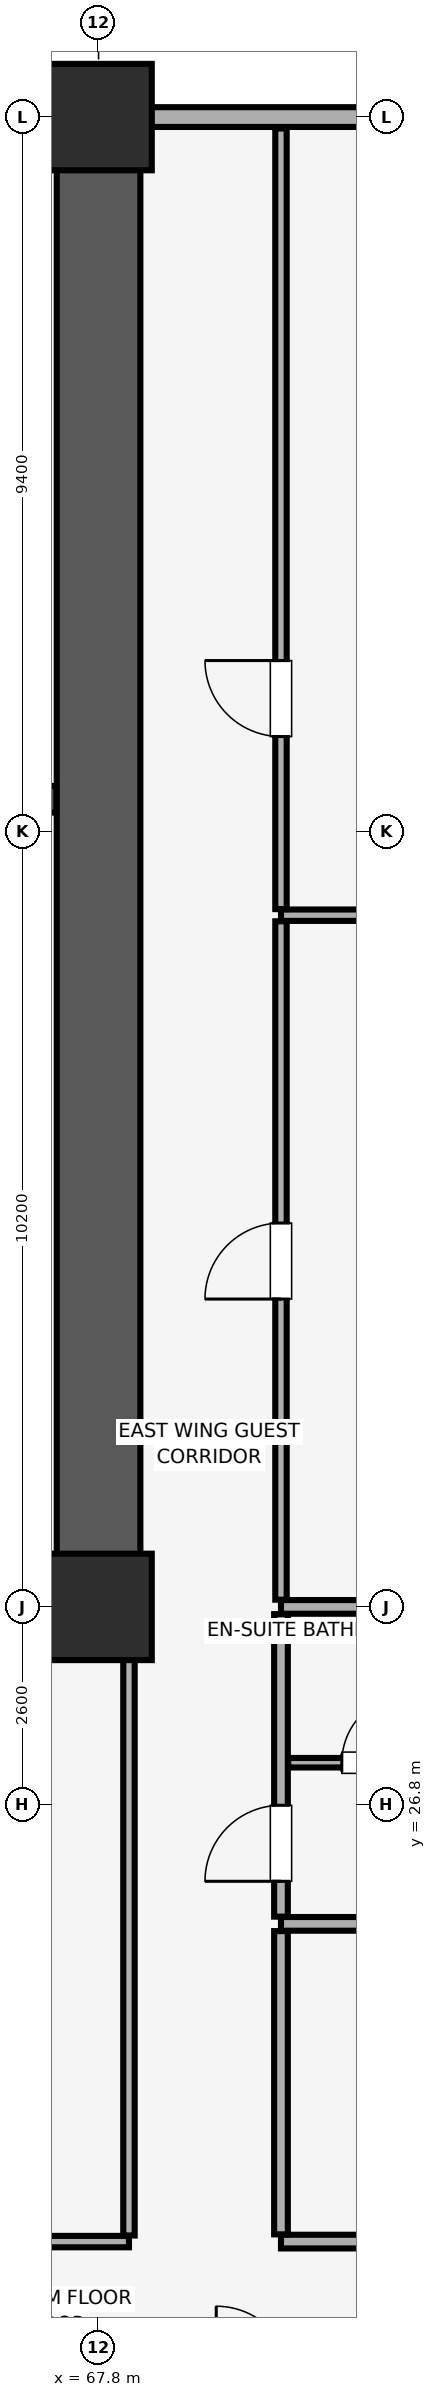
"""IFC4 building model, lengths in metres.
Left out: names, types, materials, properties, quantities, classifications, styles, units other than length and angle.
Written with IfcOpenShell. Run it as: python <this file> out.ifc"""

import sys

from ifc_helpers import new_model, si_unit, direction, frame, frame_2d, origin, origin_2d, place, context, subcontext, project, spatial, rectangle, extrude, element, fill, save


model = new_model("IFC4")
c1 = context("Model", 3, precision=1e-05, world=origin(), true_north=direction((0.0, 1.0)))
c2 = subcontext(c1, "Body", "Model", "MODEL_VIEW")
j1 = project(units=[si_unit("LENGTHUNIT", "METRE"), si_unit("PLANEANGLEUNIT", "RADIAN")], contexts=[c1])
p1 = place(None, origin())
s1 = spatial("IfcSite", under=j1, at=p1, CompositionType="ELEMENT")
p2 = place(p1, origin())
s2 = spatial("IfcBuilding", under=s1, at=p2, CompositionType="ELEMENT")
p3 = place(p2, frame((0.0, 0.0, 76.4)))
s3 = spatial("IfcBuildingStorey", under=s2, at=p3, CompositionType="ELEMENT", Elevation=76.4)
for number, where, z_axis, x_axis in (
    (1, (67.8, 29.4, 0.0), (0.0, 0.0, 1.0), (1.0, 0.0, 0.0)),
    (2, (67.8, 49.0, 0.0), (0.0, 0.0, 1.0), (1.0, 0.0, 0.0)),
):
    element("IfcColumn", number, at=place(p3, frame(where, z_axis=z_axis, x_axis=x_axis)), inside=s3, PredefinedType="COLUMN", context=c2, shape_type="SweptSolid", body=[
        extrude(rectangle(XDim=1.4, YDim=1.4, at=origin_2d()), origin(), (0.0, 0.0, 1.0), 3.4),
    ])
p4 = place(p3, frame((79.8, 49.0, 0.0), z_axis=(0.0, 0.0, 1.0), x_axis=(-1.0, 0.0, 0.0)))
e3 = element("IfcWall", 3, at=p4, inside=s3, PredefinedType="SOLIDWALL", context=c2, shape_type="SweptSolid", body=[
    extrude(rectangle(XDim=75.6, YDim=0.26, at=frame_2d((37.8, 0.0))), origin(), (0.0, 0.0, 1.0), 2.45),
])
p5 = place(p3, frame((67.8, 29.4, 0.0), z_axis=(0.0, 0.0, 1.0), x_axis=(0.0, 1.0, 0.0)))
e4 = element("IfcWall", 4, at=p5, inside=s3, PredefinedType="SHEAR", context=c2, shape_type="SweptSolid", body=[
    extrude(rectangle(XDim=19.2, YDim=1.1, at=frame_2d((9.6, 0.0))), origin(), (0.0, 0.0, 1.0), 3.4),
])
p6 = place(p3, frame((60.4, 29.4, 0.0), z_axis=(0.0, 0.0, 1.0), x_axis=(1.0, 0.0, 0.0)))
e5 = element("IfcWall", 5, at=p6, inside=s3, PredefinedType="SHEAR", context=c2, shape_type="SweptSolid", body=[
    extrude(rectangle(XDim=6.845, YDim=1.1, at=frame_2d((3.423, 0.0))), origin(), (0.0, 0.0, 1.0), 3.4),
])
p7 = place(p3, frame((63.145, 40.025, 0.0), z_axis=(0.0, 0.0, 1.0), x_axis=(1.0, 0.0, 0.0)))
e6 = element("IfcWall", 6, at=p7, inside=s3, PredefinedType="SHEAR", context=c2, shape_type="SweptSolid", body=[
    extrude(rectangle(XDim=4.1, YDim=0.35, at=frame_2d((2.05, 0.0))), origin(), (0.0, 0.0, 1.0), 3.4),
])
p8 = place(p7, frame((1.24, 0.0, 0.0)))
e7 = element("IfcOpeningElement", 7, at=p8, cuts=e6, PredefinedType="OPENING", context=c2, shape_type="SweptSolid", body=[
    extrude(rectangle(XDim=1.15, YDim=2.15, at=frame_2d((0.575, 1.075))), frame((0.0, 0.185, 0.0), z_axis=(0.0, -1.0, 0.0), x_axis=(1.0, 0.0, 0.0)), (0.0, 0.0, 1.0), 0.37),
])
p9 = place(p3, frame((54.28, 21.05, 0.0), z_axis=(0.0, 0.0, 1.0), x_axis=(1.0, 0.0, 0.0)))
e8 = element("IfcWall", 8, at=p9, inside=s3, PredefinedType="PARTITIONING", context=c2, shape_type="SweptSolid", body=[
    extrude(rectangle(XDim=13.92, YDim=0.15, at=frame_2d((6.96, 0.0))), origin(), (0.0, 0.0, 1.0), 3.4),
])
p10 = place(p9, frame((7.17, 0.0, 0.0)))
e9 = element("IfcOpeningElement", 9, at=p10, cuts=e8, PredefinedType="OPENING", context=c2, shape_type="SweptSolid", body=[
    extrude(rectangle(XDim=1.0, YDim=2.15, at=frame_2d((0.5, 1.075))), frame((0.0, 0.085, 0.0), z_axis=(0.0, -1.0, 0.0), x_axis=(1.0, 0.0, 0.0)), (0.0, 0.0, 1.0), 0.17),
])
p11 = place(p3, frame((68.2, 21.13, 0.0), z_axis=(0.0, 0.0, 1.0), x_axis=(0.0, 1.0, 0.0)))
e10 = element("IfcWall", 10, at=p11, inside=s3, PredefinedType="PARTITIONING", context=c2, shape_type="SweptSolid", body=[
    extrude(rectangle(XDim=8.26, YDim=0.15, at=frame_2d((4.13, 0.0))), origin(), (0.0, 0.0, 1.0), 3.4),
])
p12 = place(p3, frame((70.2, 21.05, 0.0), z_axis=(0.0, 0.0, 1.0), x_axis=(1.0, 0.0, 0.0)))
e11 = element("IfcWall", 11, at=p12, inside=s3, PredefinedType="PARTITIONING", context=c2, shape_type="SweptSolid", body=[
    extrude(rectangle(XDim=13.65, YDim=0.18, at=frame_2d((6.825, 0.0))), origin(), (0.0, 0.0, 1.0), 3.4),
])
p13 = place(p12, frame((1.51, 0.0, 0.0)))
e12 = element("IfcOpeningElement", 12, at=p13, cuts=e11, PredefinedType="OPENING", context=c2, shape_type="SweptSolid", body=[
    extrude(rectangle(XDim=1.0, YDim=2.15, at=frame_2d((0.5, 1.075))), frame((0.0, 0.1, 0.0), z_axis=(0.0, -1.0, 0.0), x_axis=(1.0, 0.0, 0.0)), (0.0, 0.0, 1.0), 0.2),
])
p14 = place(p3, frame((70.2, 25.23, 0.0), z_axis=(0.0, 0.0, 1.0), x_axis=(1.0, 0.0, 0.0)))
e13 = element("IfcWall", 13, at=p14, inside=s3, PredefinedType="PARTITIONING", context=c2, shape_type="SweptSolid", body=[
    extrude(rectangle(XDim=13.65, YDim=0.18, at=frame_2d((6.825, 0.0))), origin(), (0.0, 0.0, 1.0), 3.4),
])
p15 = place(p3, frame((70.2, 21.145, 0.0), z_axis=(0.0, 0.0, 1.0), x_axis=(0.0, 1.0, 0.0)))
e14 = element("IfcWall", 14, at=p15, inside=s3, PredefinedType="PARTITIONING", context=c2, shape_type="SweptSolid", body=[
    extrude(rectangle(XDim=3.99, YDim=0.18, at=frame_2d((1.995, 0.0))), origin(), (0.0, 0.0, 1.0), 3.4),
])
p16 = place(p3, frame((70.2, 29.4, 0.0), z_axis=(0.0, 0.0, 1.0), x_axis=(1.0, 0.0, 0.0)))
e15 = element("IfcWall", 15, at=p16, inside=s3, PredefinedType="PARTITIONING", context=c2, shape_type="SweptSolid", body=[
    extrude(rectangle(XDim=13.65, YDim=0.18, at=frame_2d((6.825, 0.0))), origin(), (0.0, 0.0, 1.0), 2.49),
])
p17 = place(p3, frame((70.2, 25.325, 0.0), z_axis=(0.0, 0.0, 1.0), x_axis=(0.0, 1.0, 0.0)))
e16 = element("IfcWall", 16, at=p17, inside=s3, PredefinedType="PARTITIONING", context=c2, shape_type="SweptSolid", body=[
    extrude(rectangle(XDim=3.98, YDim=0.18, at=frame_2d((1.99, 0.0))), origin(), (0.0, 0.0, 1.0), 3.4),
])
p18 = place(p17, frame((0.465, 0.0, 0.0)))
e17 = element("IfcOpeningElement", 17, at=p18, cuts=e16, PredefinedType="OPENING", context=c2, shape_type="SweptSolid", body=[
    extrude(rectangle(XDim=1.0, YDim=2.15, at=frame_2d((0.5, 1.075))), frame((0.0, 0.1, 0.0), z_axis=(0.0, -1.0, 0.0), x_axis=(1.0, 0.0, 0.0)), (0.0, 0.0, 1.0), 0.2),
])
p19 = place(p3, frame((70.295, 27.35, 0.0), z_axis=(0.0, 0.0, 1.0), x_axis=(1.0, 0.0, 0.0)))
e18 = element("IfcWall", 18, at=p19, inside=s3, PredefinedType="PARTITIONING", context=c2, shape_type="SweptSolid", body=[
    extrude(rectangle(XDim=2.405, YDim=0.125, at=frame_2d((1.203, 0.0))), origin(), (0.0, 0.0, 1.0), 3.4),
])
p20 = place(p19, frame((0.705, 0.0, 0.0)))
e19 = element("IfcOpeningElement", 19, at=p20, cuts=e18, PredefinedType="OPENING", context=c2, shape_type="SweptSolid", body=[
    extrude(rectangle(XDim=0.9, YDim=2.1, at=frame_2d((0.45, 1.05))), frame((0.0, 0.073, 0.0), z_axis=(0.0, -1.0, 0.0), x_axis=(1.0, 0.0, 0.0)), (0.0, 0.0, 1.0), 0.145),
])
p21 = place(p3, frame((70.2, 38.5, 0.0), z_axis=(0.0, 0.0, 1.0), x_axis=(1.0, 0.0, 0.0)))
e20 = element("IfcWall", 20, at=p21, inside=s3, PredefinedType="PARTITIONING", context=c2, shape_type="SweptSolid", body=[
    extrude(rectangle(XDim=13.65, YDim=0.15, at=frame_2d((6.825, 0.0))), origin(), (0.0, 0.0, 1.0), 3.4),
])
p22 = place(p3, frame((70.2, 29.495, 0.0), z_axis=(0.0, 0.0, 1.0), x_axis=(0.0, 1.0, 0.0)))
e21 = element("IfcWall", 21, at=p22, inside=s3, PredefinedType="PARTITIONING", context=c2, shape_type="SweptSolid", body=[
    extrude(rectangle(XDim=8.925, YDim=0.15, at=frame_2d((4.462, 0.0))), origin(), (0.0, 0.0, 1.0), 3.4),
])
p23 = place(p22, frame((3.955, 0.0, 0.0)))
e22 = element("IfcOpeningElement", 22, at=p23, cuts=e21, PredefinedType="OPENING", context=c2, shape_type="SweptSolid", body=[
    extrude(rectangle(XDim=1.0, YDim=2.15, at=frame_2d((0.5, 1.075))), frame((0.0, 0.085, 0.0), z_axis=(0.0, -1.0, 0.0), x_axis=(1.0, 0.0, 0.0)), (0.0, 0.0, 1.0), 0.17),
])
p24 = place(p3, frame((70.2, 38.58, 0.0), z_axis=(0.0, 0.0, 1.0), x_axis=(0.0, 1.0, 0.0)))
e23 = element("IfcWall", 23, at=p24, inside=s3, PredefinedType="PARTITIONING", context=c2, shape_type="SweptSolid", body=[
    extrude(rectangle(XDim=10.27, YDim=0.15, at=frame_2d((5.135, 0.0))), origin(), (0.0, 0.0, 1.0), 3.4),
])
p25 = place(p24, frame((2.27, 0.0, 0.0)))
e24 = element("IfcOpeningElement", 24, at=p25, cuts=e23, PredefinedType="OPENING", context=c2, shape_type="SweptSolid", body=[
    extrude(rectangle(XDim=1.0, YDim=2.15, at=frame_2d((0.5, 1.075))), frame((0.0, 0.085, 0.0), z_axis=(0.0, -1.0, 0.0), x_axis=(1.0, 0.0, 0.0)), (0.0, 0.0, 1.0), 0.17),
])
p26 = place(p18, origin())
e25 = element("IfcDoor", 25, at=p26, inside=s3, OperationType="SINGLE_SWING_LEFT", PredefinedType="DOOR", context=c2, shape_type="SweptSolid", body=[
    extrude(rectangle(XDim=1.0, YDim=2.15, at=frame_2d((0.5, 1.075))), frame((0.0, 0.025, 0.0), z_axis=(0.0, -1.0, 0.0), x_axis=(1.0, 0.0, 0.0)), (0.0, 0.0, 1.0), 0.05),
])
fill(e17, e25)
p27 = place(p20, origin())
e26 = element("IfcDoor", 26, at=p27, inside=s3, OperationType="SINGLE_SWING_RIGHT", PredefinedType="DOOR", context=c2, shape_type="SweptSolid", body=[
    extrude(rectangle(XDim=0.9, YDim=2.1, at=frame_2d((0.45, 1.05))), frame((0.0, 0.025, 0.0), z_axis=(0.0, -1.0, 0.0), x_axis=(1.0, 0.0, 0.0)), (0.0, 0.0, 1.0), 0.05),
])
fill(e19, e26)
p28 = place(p23, origin())
e27 = element("IfcDoor", 27, at=p28, inside=s3, OperationType="SINGLE_SWING_LEFT", PredefinedType="DOOR", context=c2, shape_type="SweptSolid", body=[
    extrude(rectangle(XDim=1.0, YDim=2.15, at=frame_2d((0.5, 1.075))), frame((0.0, 0.025, 0.0), z_axis=(0.0, -1.0, 0.0), x_axis=(1.0, 0.0, 0.0)), (0.0, 0.0, 1.0), 0.05),
])
fill(e22, e27)
p29 = place(p25, origin())
e28 = element("IfcDoor", 28, at=p29, inside=s3, OperationType="SINGLE_SWING_RIGHT", PredefinedType="DOOR", context=c2, shape_type="SweptSolid", body=[
    extrude(rectangle(XDim=1.0, YDim=2.15, at=frame_2d((0.5, 1.075))), frame((0.0, 0.025, 0.0), z_axis=(0.0, -1.0, 0.0), x_axis=(1.0, 0.0, 0.0)), (0.0, 0.0, 1.0), 0.05),
])
fill(e24, e28)
save(model, sys.argv[1])
